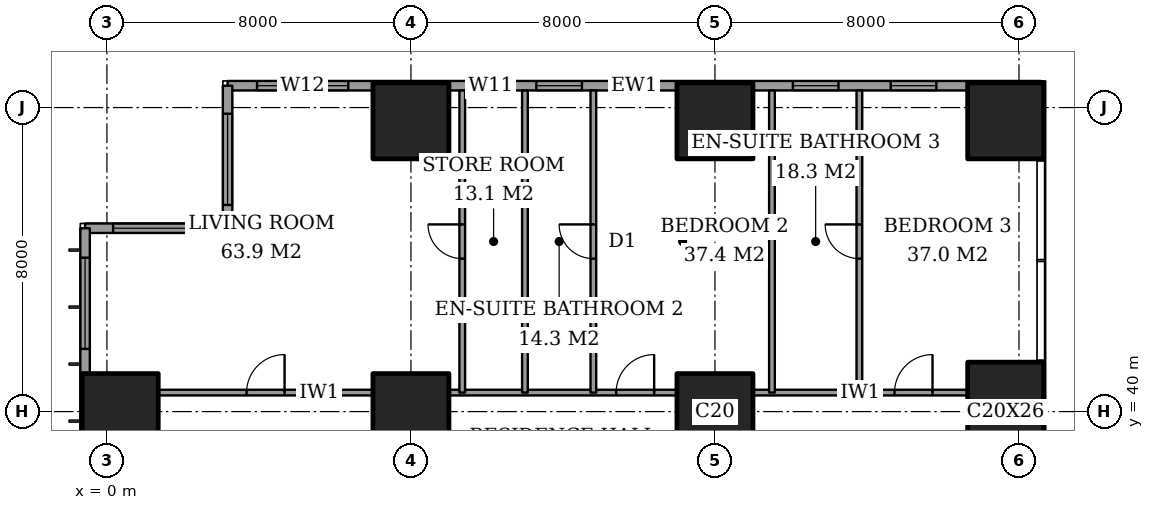
"""IFC4 building model, lengths in metres.
Left out: names, types, materials, properties, quantities, classifications, styles, units other than length and angle.
Written with IfcOpenShell. Run it as: python <this file> out.ifc"""

import sys

from ifc_helpers import new_model, si_unit, direction, frame, frame_2d, origin, origin_2d, place, context, subcontext, project, spatial, rectangle, extrude, element, fill, save


model = new_model("IFC4")
c1 = context("Model", 3, precision=1e-05, world=origin(), true_north=direction((0.0, 1.0)))
c2 = subcontext(c1, "Body", "Model", "MODEL_VIEW")
j1 = project(units=[si_unit("LENGTHUNIT", "METRE"), si_unit("PLANEANGLEUNIT", "RADIAN")], contexts=[c1])
p1 = place(None, origin())
s1 = spatial("IfcSite", under=j1, at=p1, CompositionType="ELEMENT")
p2 = place(p1, origin())
s2 = spatial("IfcBuilding", under=s1, at=p2, CompositionType="ELEMENT")
p3 = place(p2, frame((0.0, 0.0, 161.0)))
s3 = spatial("IfcBuildingStorey", under=s2, at=p3, CompositionType="ELEMENT", Elevation=161.0)
for number, where, z_axis, x_axis in (
    (1, (0.35, 40.0, 0.0), (0.0, 0.0, 1.0), (1.0, 0.0, 0.0)),
    (2, (8.0, 40.0, 0.0), (0.0, 0.0, 1.0), (1.0, 0.0, 0.0)),
    (3, (8.0, 47.65, 0.0), (0.0, 0.0, 1.0), (1.0, 0.0, 0.0)),
    (4, (16.0, 40.0, 0.0), (0.0, 0.0, 1.0), (1.0, 0.0, 0.0)),
    (5, (16.0, 47.65, 0.0), (0.0, 0.0, 1.0), (1.0, 0.0, 0.0)),
):
    element("IfcColumn", number, at=place(p3, frame(where, z_axis=z_axis, x_axis=x_axis)), inside=s3, PredefinedType="COLUMN", context=c2, shape_type="SweptSolid", body=[
        extrude(rectangle(XDim=2.0, YDim=2.0, at=origin_2d()), origin(), (0.0, 0.0, 1.0), 3.6),
    ])
p4 = place(p3, frame((23.65, 40.0, 0.0), z_axis=(0.0, 0.0, 1.0), x_axis=(1.0, 0.0, 0.0)))
e6 = element("IfcColumn", 6, at=p4, inside=s3, PredefinedType="COLUMN", context=c2, shape_type="SweptSolid", body=[
    extrude(rectangle(XDim=2.0, YDim=2.6, at=origin_2d()), origin(), (0.0, 0.0, 1.0), 3.6),
])
p5 = place(p3, frame((23.65, 47.65, 0.0), z_axis=(0.0, 0.0, 1.0), x_axis=(1.0, 0.0, 0.0)))
e7 = element("IfcColumn", 7, at=p5, inside=s3, PredefinedType="COLUMN", context=c2, shape_type="SweptSolid", body=[
    extrude(rectangle(XDim=2.0, YDim=2.0, at=origin_2d()), origin(), (0.0, 0.0, 1.0), 3.6),
])
p6 = place(p3, frame((24.575, 48.575, 0.0), z_axis=(0.0, 0.0, 1.0), x_axis=(-1.0, 0.0, 0.0)))
e8 = element("IfcWall", 8, at=p6, inside=s3, PredefinedType="SOLIDWALL", context=c2, shape_type="SweptSolid", body=[
    extrude(rectangle(XDim=21.4, YDim=0.25, at=frame_2d((10.7, 0.0))), origin(), (0.0, 0.0, 1.0), 3.6),
])
p7 = place(p6, frame((2.75, 0.0, 0.4)))
e9 = element("IfcOpeningElement", 9, at=p7, cuts=e8, PredefinedType="OPENING", context=c2, shape_type="SweptSolid", body=[
    extrude(rectangle(XDim=1.2, YDim=2.2, at=frame_2d((0.6, 1.1))), frame((0.0, 0.135, 0.0), z_axis=(0.0, -1.0, 0.0), x_axis=(1.0, 0.0, 0.0)), (0.0, 0.0, 1.0), 0.27),
])
p8 = place(p6, frame((5.325, 0.0, 0.4)))
e10 = element("IfcOpeningElement", 10, at=p8, cuts=e8, PredefinedType="OPENING", context=c2, shape_type="SweptSolid", body=[
    extrude(rectangle(XDim=1.2, YDim=2.2, at=frame_2d((0.6, 1.1))), frame((0.0, 0.135, 0.0), z_axis=(0.0, -1.0, 0.0), x_axis=(1.0, 0.0, 0.0)), (0.0, 0.0, 1.0), 0.27),
])
p9 = place(p6, frame((10.075, 0.0, 0.4)))
e11 = element("IfcOpeningElement", 11, at=p9, cuts=e8, PredefinedType="OPENING", context=c2, shape_type="SweptSolid", body=[
    extrude(rectangle(XDim=1.2, YDim=2.2, at=frame_2d((0.6, 1.1))), frame((0.0, 0.135, 0.0), z_axis=(0.0, -1.0, 0.0), x_axis=(1.0, 0.0, 0.0)), (0.0, 0.0, 1.0), 0.27),
])
p10 = place(p6, frame((12.075, 0.0, 0.4)))
e12 = element("IfcOpeningElement", 12, at=p10, cuts=e8, PredefinedType="OPENING", context=c2, shape_type="SweptSolid", body=[
    extrude(rectangle(XDim=1.2, YDim=2.2, at=frame_2d((0.6, 1.1))), frame((0.0, 0.135, 0.0), z_axis=(0.0, -1.0, 0.0), x_axis=(1.0, 0.0, 0.0)), (0.0, 0.0, 1.0), 0.27),
])
p11 = place(p6, frame((13.875, 0.0, 0.4)))
e13 = element("IfcOpeningElement", 13, at=p11, cuts=e8, PredefinedType="OPENING", context=c2, shape_type="SweptSolid", body=[
    extrude(rectangle(XDim=1.2, YDim=2.2, at=frame_2d((0.6, 1.1))), frame((0.0, 0.135, 0.0), z_axis=(0.0, -1.0, 0.0), x_axis=(1.0, 0.0, 0.0)), (0.0, 0.0, 1.0), 0.27),
])
p12 = place(p6, frame((18.225, 0.0, 0.4)))
e14 = element("IfcOpeningElement", 14, at=p12, cuts=e8, PredefinedType="OPENING", context=c2, shape_type="SweptSolid", body=[
    extrude(rectangle(XDim=2.4, YDim=2.2, at=frame_2d((1.2, 1.1))), frame((0.0, 0.135, 0.0), z_axis=(0.0, -1.0, 0.0), x_axis=(1.0, 0.0, 0.0)), (0.0, 0.0, 1.0), 0.27),
])
p13 = place(p3, frame((3.175, 48.575, 0.0), z_axis=(0.0, 0.0, 1.0), x_axis=(0.0, -1.0, 0.0)))
e15 = element("IfcWall", 15, at=p13, inside=s3, PredefinedType="SOLIDWALL", context=c2, shape_type="SweptSolid", body=[
    extrude(rectangle(XDim=3.75, YDim=0.25, at=frame_2d((1.875, 0.0))), origin(), (0.0, 0.0, 1.0), 3.6),
])
p14 = place(p13, frame((0.738, 0.0, 0.4)))
e16 = element("IfcOpeningElement", 16, at=p14, cuts=e15, PredefinedType="OPENING", context=c2, shape_type="SweptSolid", body=[
    extrude(rectangle(XDim=2.4, YDim=2.2, at=frame_2d((1.2, 1.1))), frame((0.0, 0.135, 0.0), z_axis=(0.0, -1.0, 0.0), x_axis=(1.0, 0.0, 0.0)), (0.0, 0.0, 1.0), 0.27),
])
p15 = place(p3, frame((3.175, 44.825, 0.0), z_axis=(0.0, 0.0, 1.0), x_axis=(-1.0, 0.0, 0.0)))
e17 = element("IfcWall", 17, at=p15, inside=s3, PredefinedType="SOLIDWALL", context=c2, shape_type="SweptSolid", body=[
    extrude(rectangle(XDim=3.75, YDim=0.25, at=frame_2d((1.875, 0.0))), origin(), (0.0, 0.0, 1.0), 3.6),
])
p16 = place(p15, frame((0.613, 0.0, 0.4)))
e18 = element("IfcOpeningElement", 18, at=p16, cuts=e17, PredefinedType="OPENING", context=c2, shape_type="SweptSolid", body=[
    extrude(rectangle(XDim=2.4, YDim=2.2, at=frame_2d((1.2, 1.1))), frame((0.0, 0.135, 0.0), z_axis=(0.0, -1.0, 0.0), x_axis=(1.0, 0.0, 0.0)), (0.0, 0.0, 1.0), 0.27),
])
p17 = place(p3, frame((-0.575, 44.825, 0.0), z_axis=(0.0, 0.0, 1.0), x_axis=(0.0, -1.0, 0.0)))
e19 = element("IfcWall", 19, at=p17, inside=s3, PredefinedType="SOLIDWALL", context=c2, shape_type="SweptSolid", body=[
    extrude(rectangle(XDim=41.65, YDim=0.25, at=frame_2d((20.825, 0.0))), origin(), (0.0, 0.0, 1.0), 3.6),
])
p18 = place(p17, frame((0.775, 0.0, 0.4)))
e20 = element("IfcOpeningElement", 20, at=p18, cuts=e19, PredefinedType="OPENING", context=c2, shape_type="SweptSolid", body=[
    extrude(rectangle(XDim=2.4, YDim=2.2, at=frame_2d((1.2, 1.1))), frame((0.0, 0.135, 0.0), z_axis=(0.0, -1.0, 0.0), x_axis=(1.0, 0.0, 0.0)), (0.0, 0.0, 1.0), 0.27),
])
p19 = place(p17, frame((6.1, 0.0, 0.4)))
e21 = element("IfcOpeningElement", 21, at=p19, cuts=e19, PredefinedType="OPENING", context=c2, shape_type="SweptSolid", body=[
    extrude(rectangle(XDim=1.2, YDim=2.2, at=frame_2d((0.6, 1.1))), frame((0.0, 0.135, 0.0), z_axis=(0.0, -1.0, 0.0), x_axis=(1.0, 0.0, 0.0)), (0.0, 0.0, 1.0), 0.27),
])
p20 = place(p17, frame((8.425, 0.0, 0.4)))
e22 = element("IfcOpeningElement", 22, at=p20, cuts=e19, PredefinedType="OPENING", context=c2, shape_type="SweptSolid", body=[
    extrude(rectangle(XDim=2.4, YDim=2.2, at=frame_2d((1.2, 1.1))), frame((0.0, 0.135, 0.0), z_axis=(0.0, -1.0, 0.0), x_axis=(1.0, 0.0, 0.0)), (0.0, 0.0, 1.0), 0.27),
])
p21 = place(p17, frame((15.625, 0.0, 0.4)))
e23 = element("IfcOpeningElement", 23, at=p21, cuts=e19, PredefinedType="OPENING", context=c2, shape_type="SweptSolid", body=[
    extrude(rectangle(XDim=2.4, YDim=2.2, at=frame_2d((1.2, 1.1))), frame((0.0, 0.135, 0.0), z_axis=(0.0, -1.0, 0.0), x_axis=(1.0, 0.0, 0.0)), (0.0, 0.0, 1.0), 0.27),
])
p22 = place(p17, frame((23.625, 0.0, 0.4)))
e24 = element("IfcOpeningElement", 24, at=p22, cuts=e19, PredefinedType="OPENING", context=c2, shape_type="SweptSolid", body=[
    extrude(rectangle(XDim=2.4, YDim=2.2, at=frame_2d((1.2, 1.1))), frame((0.0, 0.135, 0.0), z_axis=(0.0, -1.0, 0.0), x_axis=(1.0, 0.0, 0.0)), (0.0, 0.0, 1.0), 0.27),
])
p23 = place(p17, frame((30.825, 0.0, 0.4)))
e25 = element("IfcOpeningElement", 25, at=p23, cuts=e19, PredefinedType="OPENING", context=c2, shape_type="SweptSolid", body=[
    extrude(rectangle(XDim=2.4, YDim=2.2, at=frame_2d((1.2, 1.1))), frame((0.0, 0.135, 0.0), z_axis=(0.0, -1.0, 0.0), x_axis=(1.0, 0.0, 0.0)), (0.0, 0.0, 1.0), 0.27),
])
p24 = place(p17, frame((34.5, 0.0, 0.4)))
e26 = element("IfcOpeningElement", 26, at=p24, cuts=e19, PredefinedType="OPENING", context=c2, shape_type="SweptSolid", body=[
    extrude(rectangle(XDim=1.2, YDim=2.2, at=frame_2d((0.6, 1.1))), frame((0.0, 0.135, 0.0), z_axis=(0.0, -1.0, 0.0), x_axis=(1.0, 0.0, 0.0)), (0.0, 0.0, 1.0), 0.27),
])
p25 = place(p17, frame((38.475, 0.0, 0.4)))
e27 = element("IfcOpeningElement", 27, at=p25, cuts=e19, PredefinedType="OPENING", context=c2, shape_type="SweptSolid", body=[
    extrude(rectangle(XDim=2.4, YDim=2.2, at=frame_2d((1.2, 1.1))), frame((0.0, 0.135, 0.0), z_axis=(0.0, -1.0, 0.0), x_axis=(1.0, 0.0, 0.0)), (0.0, 0.0, 1.0), 0.27),
])
p26 = place(p3, frame((1.35, 40.5, 0.0), z_axis=(0.0, 0.0, 1.0), x_axis=(1.0, 0.0, 0.0)))
e28 = element("IfcWall", 28, at=p26, inside=s3, PredefinedType="PARTITIONING", context=c2, shape_type="SweptSolid", body=[
    extrude(rectangle(XDim=5.65, YDim=0.15, at=frame_2d((2.825, 0.0))), origin(), (0.0, 0.0, 1.0), 3.35),
])
p27 = place(p26, frame((2.325, 0.0, 0.0)))
e29 = element("IfcOpeningElement", 29, at=p27, cuts=e28, PredefinedType="OPENING", context=c2, shape_type="SweptSolid", body=[
    extrude(rectangle(XDim=1.0, YDim=2.1, at=frame_2d((0.5, 1.05))), frame((0.0, 0.085, 0.0), z_axis=(0.0, -1.0, 0.0), x_axis=(1.0, 0.0, 0.0)), (0.0, 0.0, 1.0), 0.17),
])
p28 = place(p3, frame((9.0, 40.5, 0.0), z_axis=(0.0, 0.0, 1.0), x_axis=(1.0, 0.0, 0.0)))
e30 = element("IfcWall", 30, at=p28, inside=s3, PredefinedType="PARTITIONING", context=c2, shape_type="SweptSolid", body=[
    extrude(rectangle(XDim=6.0, YDim=0.15, at=frame_2d((3.0, 0.0))), origin(), (0.0, 0.0, 1.0), 3.35),
])
p29 = place(p28, frame((4.4, 0.0, 0.0)))
e31 = element("IfcOpeningElement", 31, at=p29, cuts=e30, PredefinedType="OPENING", context=c2, shape_type="SweptSolid", body=[
    extrude(rectangle(XDim=1.0, YDim=2.1, at=frame_2d((0.5, 1.05))), frame((0.0, 0.085, 0.0), z_axis=(0.0, -1.0, 0.0), x_axis=(1.0, 0.0, 0.0)), (0.0, 0.0, 1.0), 0.17),
])
p30 = place(p3, frame((17.0, 40.5, 0.0), z_axis=(0.0, 0.0, 1.0), x_axis=(1.0, 0.0, 0.0)))
e32 = element("IfcWall", 32, at=p30, inside=s3, PredefinedType="PARTITIONING", context=c2, shape_type="SweptSolid", body=[
    extrude(rectangle(XDim=5.65, YDim=0.15, at=frame_2d((2.825, 0.0))), origin(), (0.0, 0.0, 1.0), 3.35),
])
p31 = place(p30, frame((3.725, 0.0, 0.0)))
e33 = element("IfcOpeningElement", 33, at=p31, cuts=e32, PredefinedType="OPENING", context=c2, shape_type="SweptSolid", body=[
    extrude(rectangle(XDim=1.0, YDim=2.1, at=frame_2d((0.5, 1.05))), frame((0.0, 0.085, 0.0), z_axis=(0.0, -1.0, 0.0), x_axis=(1.0, 0.0, 0.0)), (0.0, 0.0, 1.0), 0.17),
])
p32 = place(p3, frame((9.35, 40.5, 0.0), z_axis=(0.0, 0.0, 1.0), x_axis=(0.0, 1.0, 0.0)))
e34 = element("IfcWall", 34, at=p32, inside=s3, PredefinedType="PARTITIONING", context=c2, shape_type="SweptSolid", body=[
    extrude(rectangle(XDim=7.95, YDim=0.15, at=frame_2d((3.975, 0.0))), origin(), (0.0, 0.0, 1.0), 3.35),
])
p33 = place(p32, frame((3.525, 0.0, 0.0)))
e35 = element("IfcOpeningElement", 35, at=p33, cuts=e34, PredefinedType="OPENING", context=c2, shape_type="SweptSolid", body=[
    extrude(rectangle(XDim=0.9, YDim=2.1, at=frame_2d((0.45, 1.05))), frame((0.0, 0.085, 0.0), z_axis=(0.0, -1.0, 0.0), x_axis=(1.0, 0.0, 0.0)), (0.0, 0.0, 1.0), 0.17),
])
p34 = place(p3, frame((11.0, 40.5, 0.0), z_axis=(0.0, 0.0, 1.0), x_axis=(0.0, 1.0, 0.0)))
e36 = element("IfcWall", 36, at=p34, inside=s3, PredefinedType="PARTITIONING", context=c2, shape_type="SweptSolid", body=[
    extrude(rectangle(XDim=7.95, YDim=0.15, at=frame_2d((3.975, 0.0))), origin(), (0.0, 0.0, 1.0), 3.35),
])
p35 = place(p3, frame((12.8, 40.5, 0.0), z_axis=(0.0, 0.0, 1.0), x_axis=(0.0, 1.0, 0.0)))
e37 = element("IfcWall", 37, at=p35, inside=s3, PredefinedType="PARTITIONING", context=c2, shape_type="SweptSolid", body=[
    extrude(rectangle(XDim=7.95, YDim=0.15, at=frame_2d((3.975, 0.0))), origin(), (0.0, 0.0, 1.0), 3.35),
])
p36 = place(p35, frame((3.525, 0.0, 0.0)))
e38 = element("IfcOpeningElement", 38, at=p36, cuts=e37, PredefinedType="OPENING", context=c2, shape_type="SweptSolid", body=[
    extrude(rectangle(XDim=0.9, YDim=2.1, at=frame_2d((0.45, 1.05))), frame((0.0, 0.085, 0.0), z_axis=(0.0, -1.0, 0.0), x_axis=(1.0, 0.0, 0.0)), (0.0, 0.0, 1.0), 0.17),
])
p37 = place(p3, frame((17.5, 40.5, 0.0), z_axis=(0.0, 0.0, 1.0), x_axis=(0.0, 1.0, 0.0)))
e39 = element("IfcWall", 39, at=p37, inside=s3, PredefinedType="PARTITIONING", context=c2, shape_type="SweptSolid", body=[
    extrude(rectangle(XDim=7.95, YDim=0.15, at=frame_2d((3.975, 0.0))), origin(), (0.0, 0.0, 1.0), 3.35),
])
p38 = place(p3, frame((19.8, 40.5, 0.0), z_axis=(0.0, 0.0, 1.0), x_axis=(0.0, 1.0, 0.0)))
e40 = element("IfcWall", 40, at=p38, inside=s3, PredefinedType="PARTITIONING", context=c2, shape_type="SweptSolid", body=[
    extrude(rectangle(XDim=7.95, YDim=0.15, at=frame_2d((3.975, 0.0))), origin(), (0.0, 0.0, 1.0), 3.35),
])
p39 = place(p38, frame((3.525, 0.0, 0.0)))
e41 = element("IfcOpeningElement", 41, at=p39, cuts=e40, PredefinedType="OPENING", context=c2, shape_type="SweptSolid", body=[
    extrude(rectangle(XDim=0.9, YDim=2.1, at=frame_2d((0.45, 1.05))), frame((0.0, 0.085, 0.0), z_axis=(0.0, -1.0, 0.0), x_axis=(1.0, 0.0, 0.0)), (0.0, 0.0, 1.0), 0.17),
])
p40 = place(p7, origin())
e42 = element("IfcWindow", 42, at=p40, inside=s3, PartitioningType="SINGLE_PANEL", PredefinedType="WINDOW", context=c2, shape_type="SweptSolid", body=[
    extrude(rectangle(XDim=1.2, YDim=2.2, at=frame_2d((0.6, 1.1))), frame((0.0, 0.03, 0.0), z_axis=(0.0, -1.0, 0.0), x_axis=(1.0, 0.0, 0.0)), (0.0, 0.0, 1.0), 0.06),
])
fill(e9, e42)
p41 = place(p8, origin())
e43 = element("IfcWindow", 43, at=p41, inside=s3, PartitioningType="SINGLE_PANEL", PredefinedType="WINDOW", context=c2, shape_type="SweptSolid", body=[
    extrude(rectangle(XDim=1.2, YDim=2.2, at=frame_2d((0.6, 1.1))), frame((0.0, 0.03, 0.0), z_axis=(0.0, -1.0, 0.0), x_axis=(1.0, 0.0, 0.0)), (0.0, 0.0, 1.0), 0.06),
])
fill(e10, e43)
p42 = place(p9, origin())
e44 = element("IfcWindow", 44, at=p42, inside=s3, PartitioningType="SINGLE_PANEL", PredefinedType="WINDOW", context=c2, shape_type="SweptSolid", body=[
    extrude(rectangle(XDim=1.2, YDim=2.2, at=frame_2d((0.6, 1.1))), frame((0.0, 0.03, 0.0), z_axis=(0.0, -1.0, 0.0), x_axis=(1.0, 0.0, 0.0)), (0.0, 0.0, 1.0), 0.06),
])
fill(e11, e44)
p43 = place(p10, origin())
e45 = element("IfcWindow", 45, at=p43, inside=s3, PartitioningType="SINGLE_PANEL", PredefinedType="WINDOW", context=c2, shape_type="SweptSolid", body=[
    extrude(rectangle(XDim=1.2, YDim=2.2, at=frame_2d((0.6, 1.1))), frame((0.0, 0.03, 0.0), z_axis=(0.0, -1.0, 0.0), x_axis=(1.0, 0.0, 0.0)), (0.0, 0.0, 1.0), 0.06),
])
fill(e12, e45)
p44 = place(p11, origin())
e46 = element("IfcWindow", 46, at=p44, inside=s3, PartitioningType="SINGLE_PANEL", PredefinedType="WINDOW", context=c2, shape_type="SweptSolid", body=[
    extrude(rectangle(XDim=1.2, YDim=2.2, at=frame_2d((0.6, 1.1))), frame((0.0, 0.03, 0.0), z_axis=(0.0, -1.0, 0.0), x_axis=(1.0, 0.0, 0.0)), (0.0, 0.0, 1.0), 0.06),
])
fill(e13, e46)
p45 = place(p12, origin())
e47 = element("IfcWindow", 47, at=p45, inside=s3, PartitioningType="SINGLE_PANEL", PredefinedType="WINDOW", context=c2, shape_type="SweptSolid", body=[
    extrude(rectangle(XDim=2.4, YDim=2.2, at=frame_2d((1.2, 1.1))), frame((0.0, 0.03, 0.0), z_axis=(0.0, -1.0, 0.0), x_axis=(1.0, 0.0, 0.0)), (0.0, 0.0, 1.0), 0.06),
])
fill(e14, e47)
p46 = place(p14, origin())
e48 = element("IfcWindow", 48, at=p46, inside=s3, PartitioningType="SINGLE_PANEL", PredefinedType="WINDOW", context=c2, shape_type="SweptSolid", body=[
    extrude(rectangle(XDim=2.4, YDim=2.2, at=frame_2d((1.2, 1.1))), frame((0.0, 0.03, 0.0), z_axis=(0.0, -1.0, 0.0), x_axis=(1.0, 0.0, 0.0)), (0.0, 0.0, 1.0), 0.06),
])
fill(e16, e48)
p47 = place(p16, origin())
e49 = element("IfcWindow", 49, at=p47, inside=s3, PartitioningType="SINGLE_PANEL", PredefinedType="WINDOW", context=c2, shape_type="SweptSolid", body=[
    extrude(rectangle(XDim=2.4, YDim=2.2, at=frame_2d((1.2, 1.1))), frame((0.0, 0.03, 0.0), z_axis=(0.0, -1.0, 0.0), x_axis=(1.0, 0.0, 0.0)), (0.0, 0.0, 1.0), 0.06),
])
fill(e18, e49)
p48 = place(p18, origin())
e50 = element("IfcWindow", 50, at=p48, inside=s3, PartitioningType="SINGLE_PANEL", PredefinedType="WINDOW", context=c2, shape_type="SweptSolid", body=[
    extrude(rectangle(XDim=2.4, YDim=2.2, at=frame_2d((1.2, 1.1))), frame((0.0, 0.03, 0.0), z_axis=(0.0, -1.0, 0.0), x_axis=(1.0, 0.0, 0.0)), (0.0, 0.0, 1.0), 0.06),
])
fill(e20, e50)
p49 = place(p27, origin())
e51 = element("IfcDoor", 51, at=p49, inside=s3, OperationType="SINGLE_SWING_LEFT", PredefinedType="DOOR", context=c2, shape_type="SweptSolid", body=[
    extrude(rectangle(XDim=1.0, YDim=2.1, at=frame_2d((0.5, 1.05))), frame((0.0, 0.025, 0.0), z_axis=(0.0, -1.0, 0.0), x_axis=(1.0, 0.0, 0.0)), (0.0, 0.0, 1.0), 0.05),
])
fill(e29, e51)
p50 = place(p33, origin())
e52 = element("IfcDoor", 52, at=p50, inside=s3, OperationType="SINGLE_SWING_LEFT", PredefinedType="DOOR", context=c2, shape_type="SweptSolid", body=[
    extrude(rectangle(XDim=0.9, YDim=2.1, at=frame_2d((0.45, 1.05))), frame((0.0, 0.025, 0.0), z_axis=(0.0, -1.0, 0.0), x_axis=(1.0, 0.0, 0.0)), (0.0, 0.0, 1.0), 0.05),
])
fill(e35, e52)
p51 = place(p36, origin())
e53 = element("IfcDoor", 53, at=p51, inside=s3, OperationType="SINGLE_SWING_LEFT", PredefinedType="DOOR", context=c2, shape_type="SweptSolid", body=[
    extrude(rectangle(XDim=0.9, YDim=2.1, at=frame_2d((0.45, 1.05))), frame((0.0, 0.025, 0.0), z_axis=(0.0, -1.0, 0.0), x_axis=(1.0, 0.0, 0.0)), (0.0, 0.0, 1.0), 0.05),
])
fill(e38, e53)
p52 = place(p29, origin())
e54 = element("IfcDoor", 54, at=p52, inside=s3, OperationType="SINGLE_SWING_LEFT", PredefinedType="DOOR", context=c2, shape_type="SweptSolid", body=[
    extrude(rectangle(XDim=1.0, YDim=2.1, at=frame_2d((0.5, 1.05))), frame((0.0, 0.025, 0.0), z_axis=(0.0, -1.0, 0.0), x_axis=(1.0, 0.0, 0.0)), (0.0, 0.0, 1.0), 0.05),
])
fill(e31, e54)
p53 = place(p39, origin())
e55 = element("IfcDoor", 55, at=p53, inside=s3, OperationType="SINGLE_SWING_LEFT", PredefinedType="DOOR", context=c2, shape_type="SweptSolid", body=[
    extrude(rectangle(XDim=0.9, YDim=2.1, at=frame_2d((0.45, 1.05))), frame((0.0, 0.025, 0.0), z_axis=(0.0, -1.0, 0.0), x_axis=(1.0, 0.0, 0.0)), (0.0, 0.0, 1.0), 0.05),
])
fill(e41, e55)
p54 = place(p31, origin())
e56 = element("IfcDoor", 56, at=p54, inside=s3, OperationType="SINGLE_SWING_LEFT", PredefinedType="DOOR", context=c2, shape_type="SweptSolid", body=[
    extrude(rectangle(XDim=1.0, YDim=2.1, at=frame_2d((0.5, 1.05))), frame((0.0, 0.025, 0.0), z_axis=(0.0, -1.0, 0.0), x_axis=(1.0, 0.0, 0.0)), (0.0, 0.0, 1.0), 0.05),
])
fill(e33, e56)
save(model, sys.argv[1])
